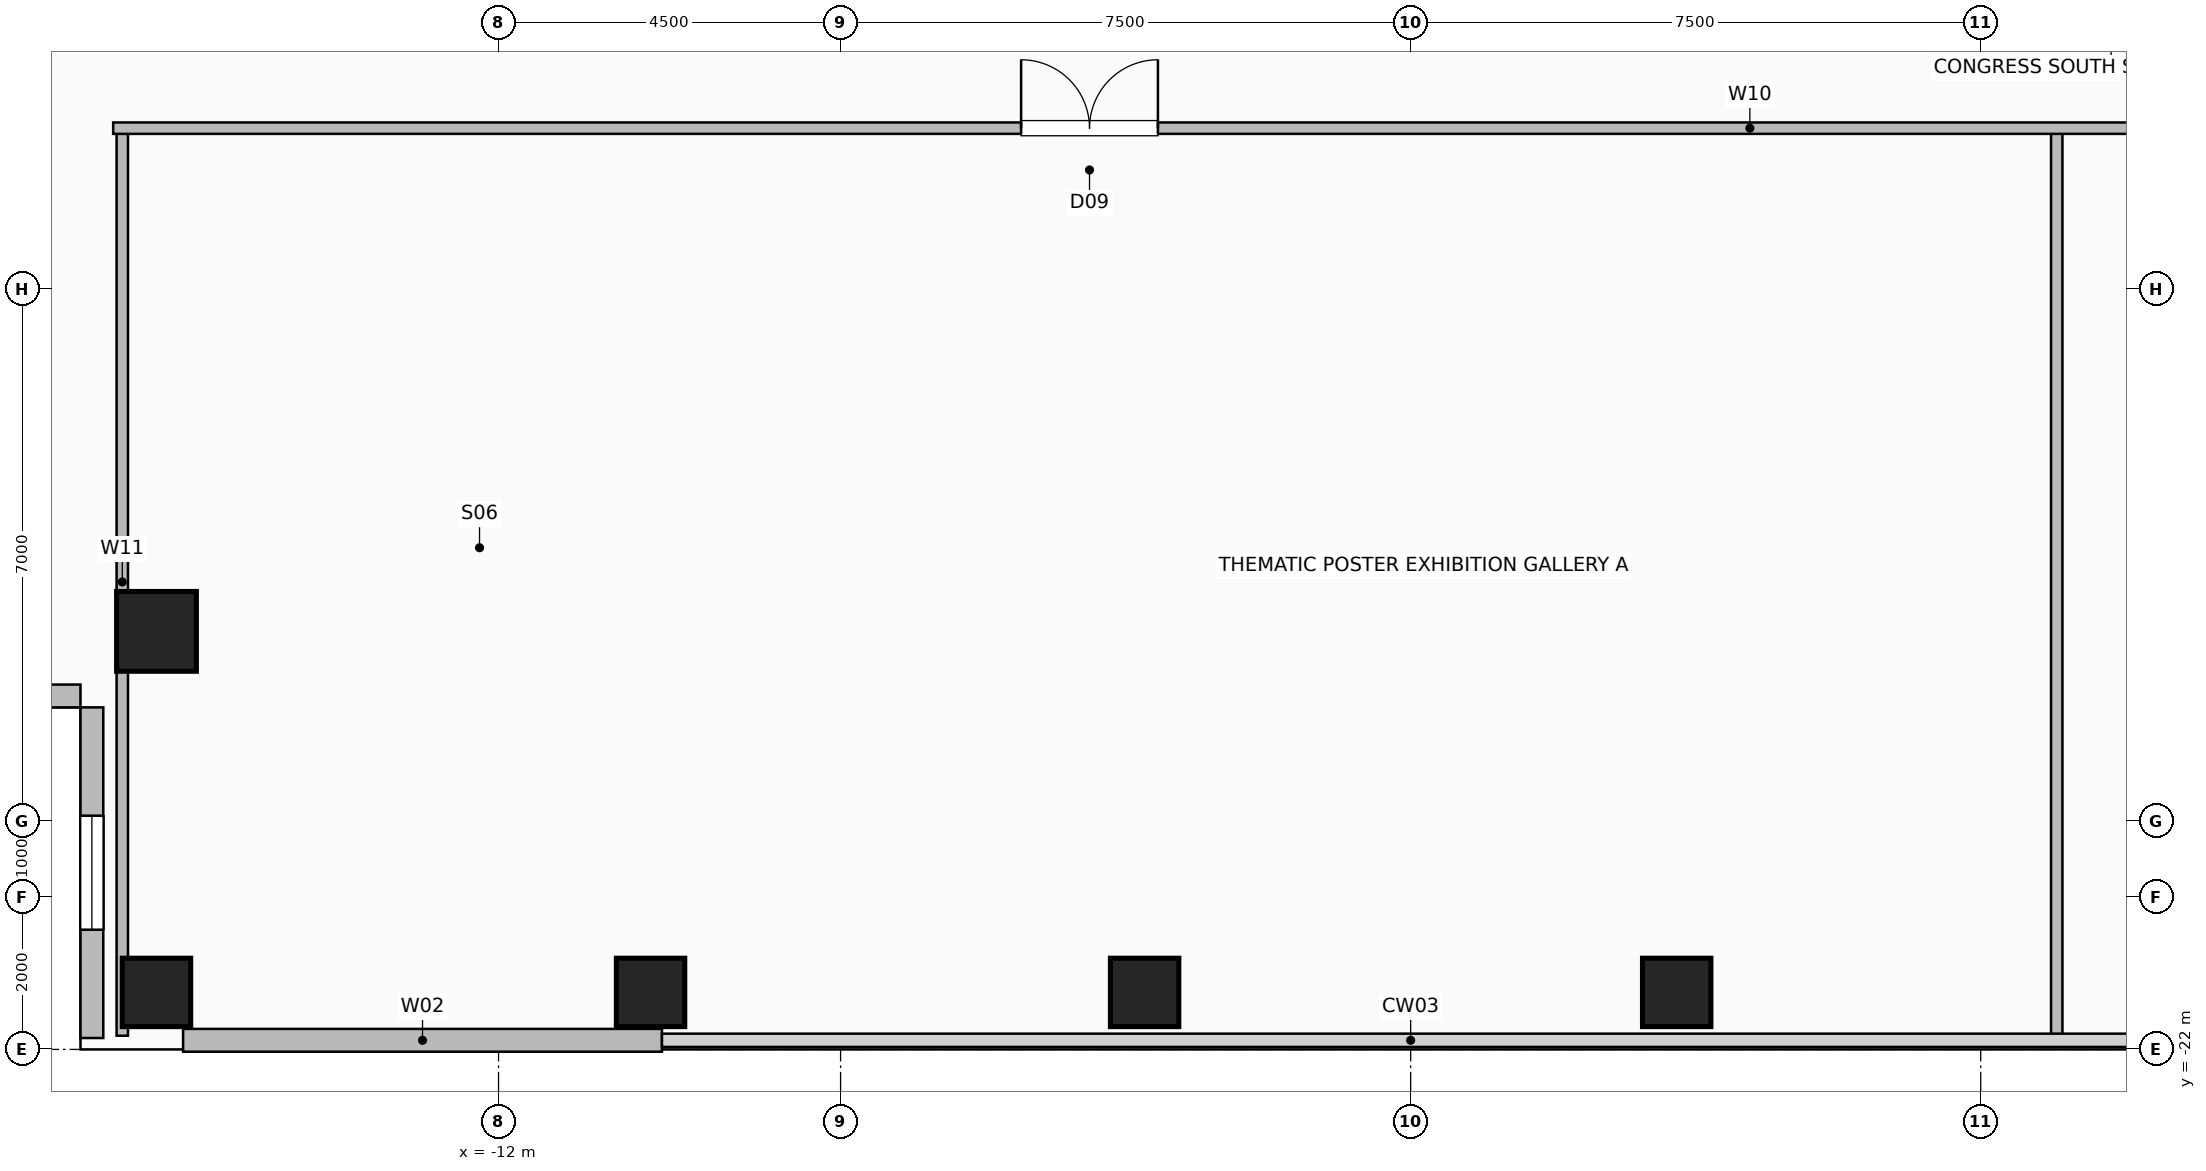
"""IFC4 building model, lengths in metres.
Left out: names, types, materials, properties, quantities, classifications, styles, units other than length and angle.
Written with IfcOpenShell. Run it as: python <this file> out.ifc"""

import sys

from ifc_helpers import new_model, si_unit, direction, frame, frame_2d, origin, origin_2d, place, context, subcontext, project, spatial, rectangle, hollow_rectangle, extrude, element, fill, save


model = new_model("IFC4")
c1 = context("Model", 3, precision=1e-05, world=origin(), true_north=direction((0.0, 1.0)))
c2 = subcontext(c1, "Body", "Model", "MODEL_VIEW")
j1 = project(units=[si_unit("LENGTHUNIT", "METRE"), si_unit("PLANEANGLEUNIT", "RADIAN")], contexts=[c1])
p1 = place(None, origin())
s1 = spatial("IfcSite", under=j1, at=p1, CompositionType="ELEMENT")
p2 = place(p1, origin())
s2 = spatial("IfcBuilding", under=s1, at=p2, CompositionType="ELEMENT")
p3 = place(p2, frame((0.0, 0.0, 144.4)))
s3 = spatial("IfcBuildingStorey", under=s2, at=p3, CompositionType="ELEMENT", Elevation=144.4)
for number, where, z_axis, x_axis in (
    (1, (-16.5, -21.25, 0.0), (0.0, 0.0, 1.0), (1.0, 0.0, 0.0)),
    (2, (-10.0, -21.25, 0.0), (0.0, 0.0, 1.0), (1.0, 0.0, 0.0)),
    (3, (-3.5, -21.25, 0.0), (0.0, 0.0, 1.0), (1.0, 0.0, 0.0)),
    (4, (3.5, -21.25, 0.0), (0.0, 0.0, 1.0), (1.0, 0.0, 0.0)),
):
    element("IfcColumn", number, at=place(p3, frame(where, z_axis=z_axis, x_axis=x_axis)), inside=s3, PredefinedType="COLUMN", context=c2, shape_type="SweptSolid", body=[
        extrude(hollow_rectangle(XDim=0.9, YDim=0.9, WallThickness=0.045, at=origin_2d()), origin(), (0.0, 0.0, 1.0), 3.6),
    ])
p4 = place(p3, frame((-16.5, -16.5, 0.0), z_axis=(0.0, 0.0, 1.0), x_axis=(1.0, 0.0, 0.0)))
e5 = element("IfcColumn", 5, at=p4, inside=s3, PredefinedType="COLUMN", context=c2, shape_type="SweptSolid", body=[
    extrude(hollow_rectangle(XDim=1.05, YDim=1.05, WallThickness=0.05, at=origin_2d()), origin(), (0.0, 0.0, 1.0), 3.6),
])
p5 = place(p3, frame((-16.15, -21.88, 0.0), z_axis=(0.0, 0.0, 1.0), x_axis=(1.0, 0.0, 0.0)))
e6 = element("IfcWall", 6, at=p5, inside=s3, PredefinedType="SOLIDWALL", context=c2, shape_type="SweptSolid", body=[
    extrude(rectangle(XDim=6.3, YDim=0.3, at=frame_2d((3.15, 0.0))), origin(), (0.0, 0.0, 1.0), 3.36),
])
p6 = place(p3, frame((-17.35, -21.85, 0.0), z_axis=(0.0, 0.0, 1.0), x_axis=(0.0, 1.0, 0.0)))
e7 = element("IfcWall", 7, at=p6, inside=s3, PredefinedType="SOLIDWALL", context=c2, shape_type="SweptSolid", body=[
    extrude(rectangle(XDim=4.35, YDim=0.3, at=frame_2d((2.175, 0.0))), origin(), (0.0, 0.0, 1.0), 3.36),
])
p7 = place(p6, frame((1.425, 0.0, 0.9)))
e8 = element("IfcOpeningElement", 8, at=p7, cuts=e7, PredefinedType="OPENING", context=c2, shape_type="SweptSolid", body=[
    extrude(rectangle(XDim=1.5, YDim=1.8, at=frame_2d((0.75, 0.9))), frame((0.0, 0.16, 0.0), z_axis=(0.0, -1.0, 0.0), x_axis=(1.0, 0.0, 0.0)), (0.0, 0.0, 1.0), 0.32),
])
p8 = place(p3, frame((-21.85, -17.35, 0.0), z_axis=(0.0, 0.0, 1.0), x_axis=(1.0, 0.0, 0.0)))
e9 = element("IfcWall", 9, at=p8, inside=s3, PredefinedType="SOLIDWALL", context=c2, shape_type="SweptSolid", body=[
    extrude(rectangle(XDim=4.35, YDim=0.3, at=frame_2d((2.175, 0.0))), origin(), (0.0, 0.0, 1.0), 3.36),
])
for number, where, z_axis, x_axis in (
    (10, (-16.95, -21.82, 0.0), (0.0, 0.0, 1.0), (0.0, 1.0, 0.0)),
    (11, (8.5, -21.82, 0.0), (0.0, 0.0, 1.0), (0.0, 1.0, 0.0)),
):
    element("IfcWall", number, at=place(p3, frame(where, z_axis=z_axis, x_axis=x_axis)), inside=s3, PredefinedType="PARTITIONING", context=c2, shape_type="SweptSolid", body=[
        extrude(rectangle(XDim=11.94, YDim=0.15, at=frame_2d((5.97, 0.0))), origin(), (0.0, 0.0, 1.0), 3.36),
    ])
p9 = place(p3, frame((-17.07, -9.88, 0.0), z_axis=(0.0, 0.0, 1.0), x_axis=(1.0, 0.0, 0.0)))
e12 = element("IfcWall", 12, at=p9, inside=s3, PredefinedType="PARTITIONING", context=c2, shape_type="SweptSolid", body=[
    extrude(rectangle(XDim=34.14, YDim=0.15, at=frame_2d((17.07, 0.0))), origin(), (0.0, 0.0, 1.0), 3.36),
])
p10 = place(p9, frame((11.945, 0.0, 0.0)))
e13 = element("IfcOpeningElement", 13, at=p10, cuts=e12, PredefinedType="OPENING", context=c2, shape_type="SweptSolid", body=[
    extrude(rectangle(XDim=1.8, YDim=2.08, at=frame_2d((0.9, 1.04))), frame((0.0, 0.085, 0.0), z_axis=(0.0, -1.0, 0.0), x_axis=(1.0, 0.0, 0.0)), (0.0, 0.0, 1.0), 0.17),
])
p11 = place(p9, frame((29.32, 0.0, 0.0)))
e14 = element("IfcOpeningElement", 14, at=p11, cuts=e12, PredefinedType="OPENING", context=c2, shape_type="SweptSolid", body=[
    extrude(rectangle(XDim=0.95, YDim=2.06, at=frame_2d((0.475, 1.03))), frame((0.0, 0.085, 0.0), z_axis=(0.0, -1.0, 0.0), x_axis=(1.0, 0.0, 0.0)), (0.0, 0.0, 1.0), 0.17),
])
p12 = place(p7, origin())
e15 = element("IfcWindow", 15, at=p12, inside=s3, PartitioningType="SINGLE_PANEL", PredefinedType="WINDOW", context=c2, shape_type="SweptSolid", body=[
    extrude(rectangle(XDim=1.5, YDim=1.8, at=frame_2d((0.75, 0.9))), frame((0.0, 0.03, 0.0), z_axis=(0.0, -1.0, 0.0), x_axis=(1.0, 0.0, 0.0)), (0.0, 0.0, 1.0), 0.06),
])
fill(e8, e15)
p13 = place(p10, origin())
e16 = element("IfcDoor", 16, at=p13, inside=s3, OperationType="DOUBLE_DOOR_SINGLE_SWING", PredefinedType="DOOR", context=c2, shape_type="SweptSolid", body=[
    extrude(rectangle(XDim=1.8, YDim=2.08, at=frame_2d((0.9, 1.04))), frame((0.0, 0.025, 0.0), z_axis=(0.0, -1.0, 0.0), x_axis=(1.0, 0.0, 0.0)), (0.0, 0.0, 1.0), 0.05),
])
fill(e13, e16)
save(model, sys.argv[1])
